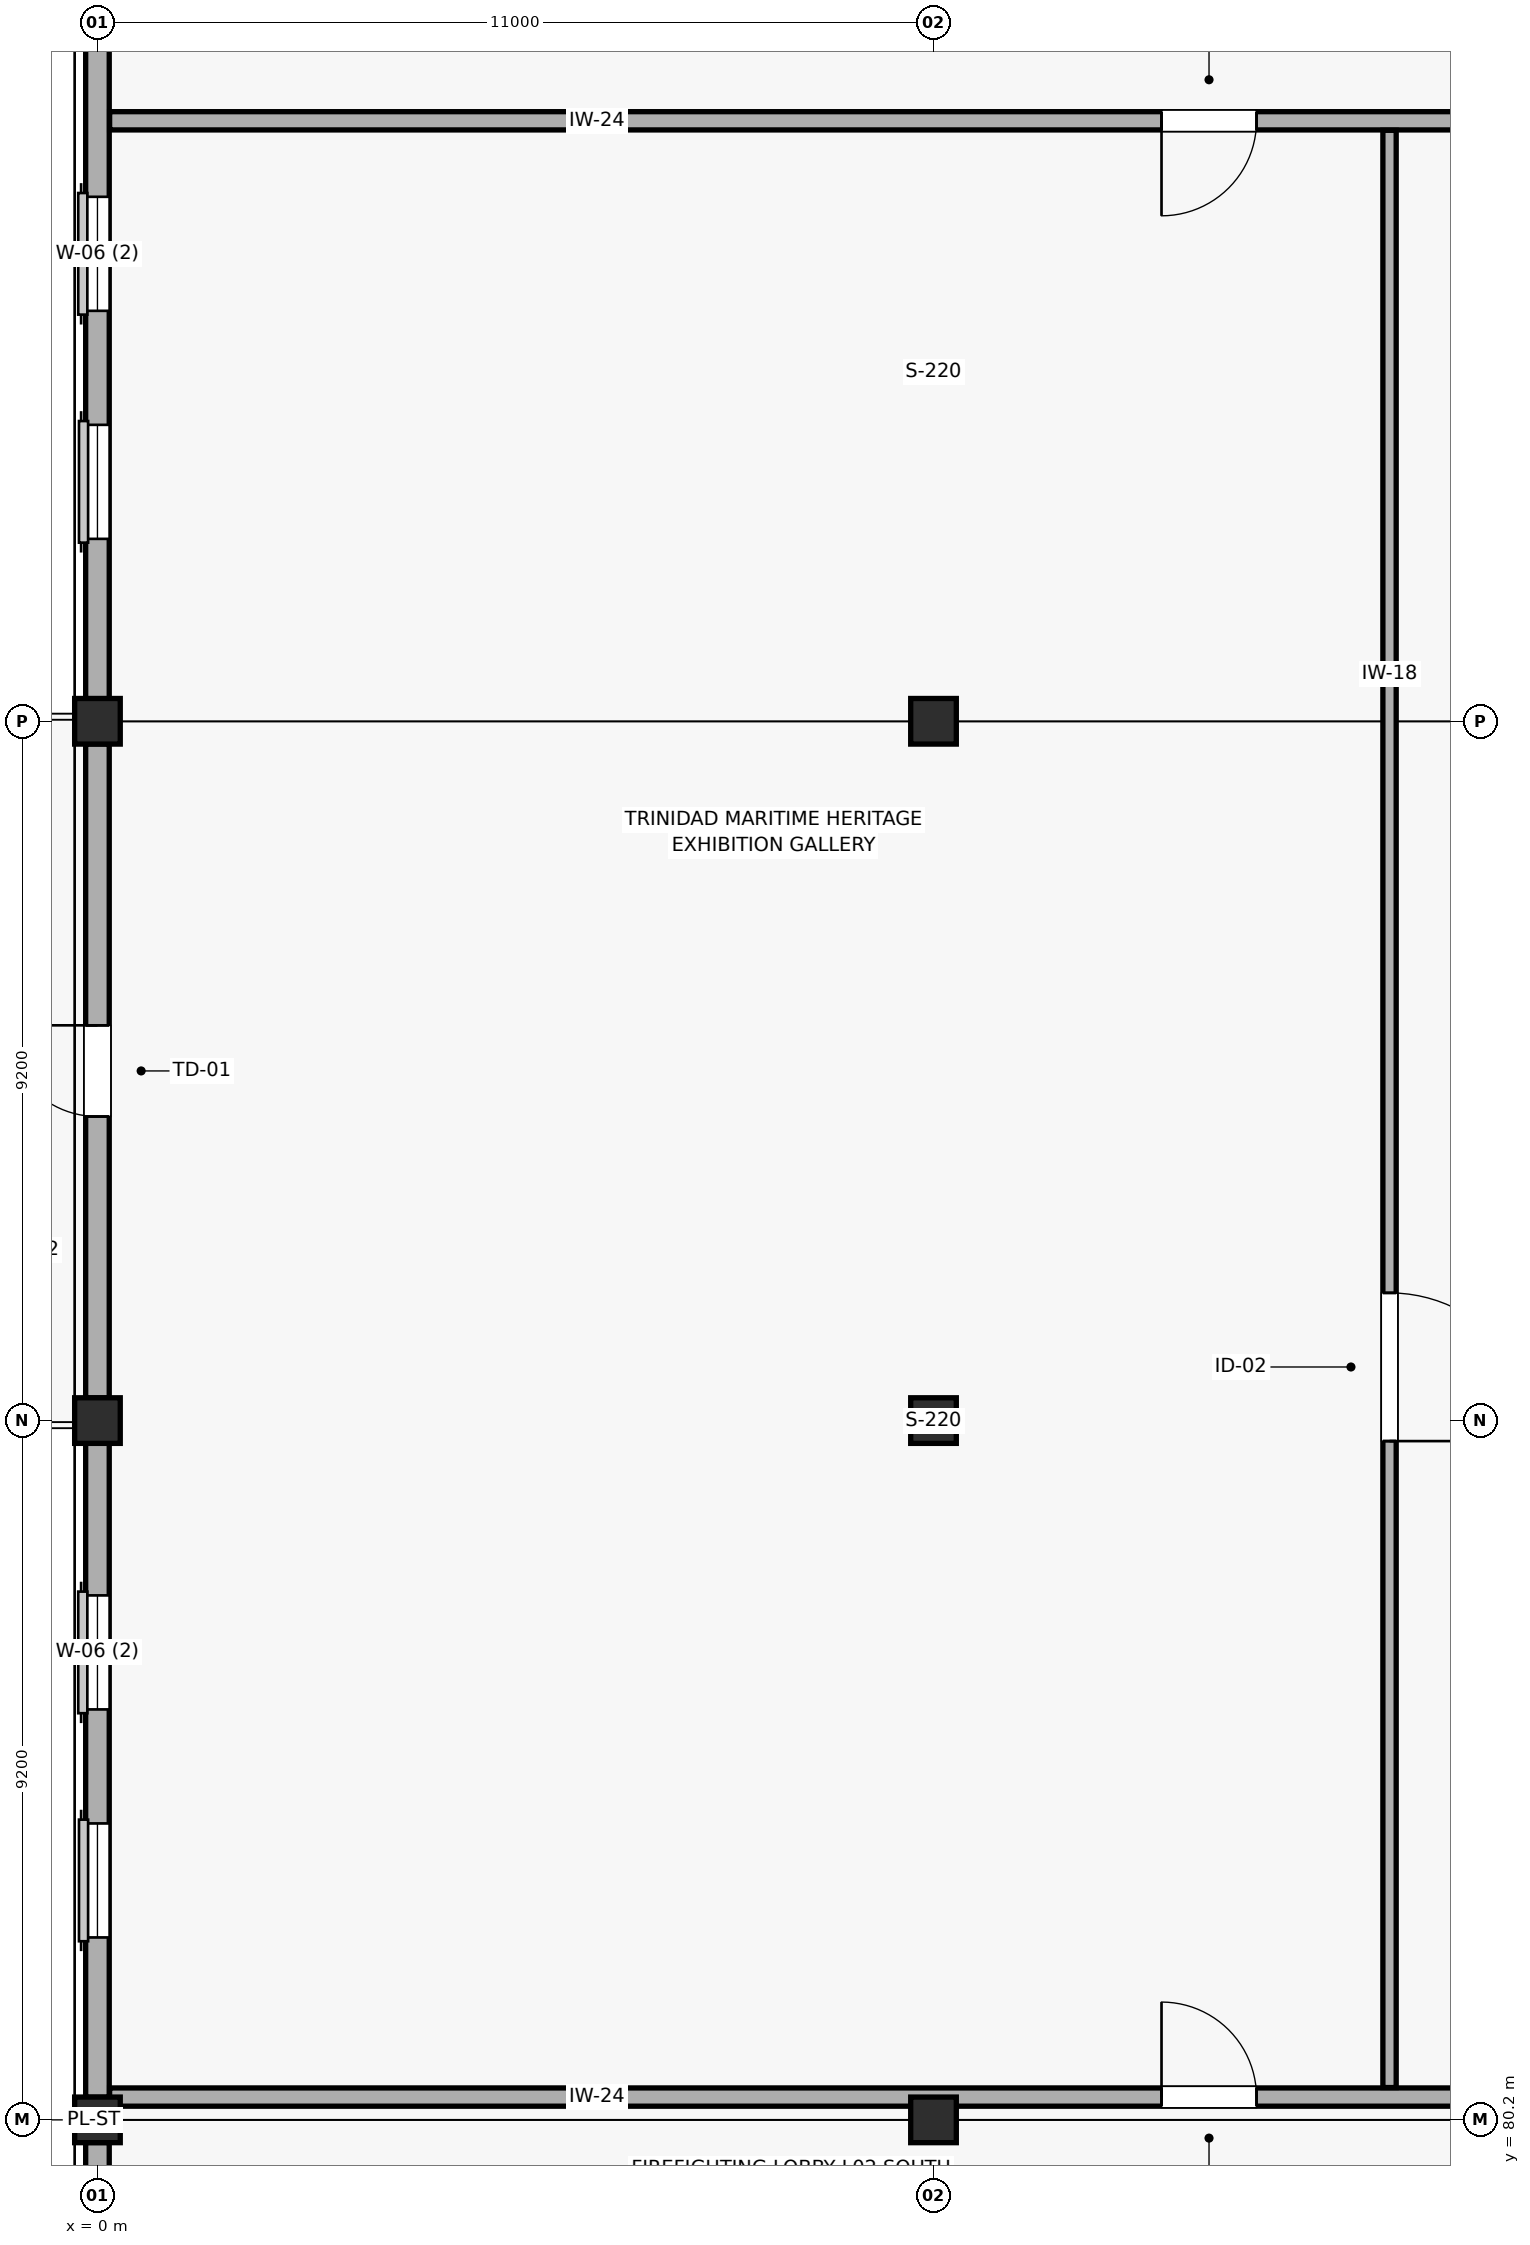
"""IFC4 building model, lengths in metres.
Left out: names, types, materials, properties, quantities, classifications, styles, units other than length and angle.
Written with IfcOpenShell. Run it as: python <this file> out.ifc"""

import sys

from ifc_helpers import new_model, si_unit, direction, frame, frame_2d, origin, origin_2d, place, context, subcontext, project, spatial, rectangle, extrude, element, fill, save


model = new_model("IFC4")
c1 = context("Model", 3, precision=1e-05, world=origin(), true_north=direction((0.0, 1.0)))
c2 = subcontext(c1, "Body", "Model", "MODEL_VIEW")
j1 = project(units=[si_unit("LENGTHUNIT", "METRE"), si_unit("PLANEANGLEUNIT", "RADIAN")], contexts=[c1])
p1 = place(None, origin())
s1 = spatial("IfcSite", under=j1, at=p1, CompositionType="ELEMENT")
p2 = place(p1, origin())
s2 = spatial("IfcBuilding", under=s1, at=p2, CompositionType="ELEMENT")
p3 = place(p2, frame((0.0, 0.0, 9.9)))
s3 = spatial("IfcBuildingStorey", under=s2, at=p3, CompositionType="ELEMENT", Elevation=9.9)
for number, where, z_axis, x_axis in (
    (1, (0.0, 80.2, 0.0), (0.0, 0.0, 1.0), (1.0, 0.0, 0.0)),
    (2, (0.0, 89.4, 0.0), (0.0, 0.0, 1.0), (1.0, 0.0, 0.0)),
    (3, (0.0, 98.6, 0.0), (0.0, 0.0, 1.0), (1.0, 0.0, 0.0)),
    (4, (11.0, 80.2, 0.0), (0.0, 0.0, 1.0), (1.0, 0.0, 0.0)),
    (5, (11.0, 89.4, 0.0), (0.0, 0.0, 1.0), (1.0, 0.0, 0.0)),
    (6, (11.0, 98.6, 0.0), (0.0, 0.0, 1.0), (1.0, 0.0, 0.0)),
):
    element("IfcColumn", number, at=place(p3, frame(where, z_axis=z_axis, x_axis=x_axis)), inside=s3, PredefinedType="COLUMN", context=c2, shape_type="SweptSolid", body=[
        extrude(rectangle(XDim=0.6, YDim=0.6, at=origin_2d()), origin(), (0.0, 0.0, 1.0), 4.2),
    ])
p4 = place(p3, frame((0.0, 79.902, 0.0), z_axis=(0.0, 0.0, 1.0), x_axis=(0.0, -1.0, 0.0)))
e7 = element("IfcWall", 7, at=p4, inside=s3, PredefinedType="SOLIDWALL", context=c2, shape_type="SweptSolid", body=[
    extrude(rectangle(XDim=8.004, YDim=0.31, at=frame_2d((4.002, 0.0))), origin(), (0.0, 0.0, 1.0), 3.525),
])
p5 = place(p4, frame((2.002, 0.0, 0.95)))
e8 = element("IfcOpeningElement", 8, at=p5, cuts=e7, PredefinedType="OPENING", context=c2, shape_type="SweptSolid", body=[
    extrude(rectangle(XDim=1.65, YDim=2.25, at=frame_2d((0.825, 1.125))), frame((0.0, 0.165, 0.0), z_axis=(0.0, -1.0, 0.0), x_axis=(1.0, 0.0, 0.0)), (0.0, 0.0, 1.0), 0.33),
])
p6 = place(p4, frame((5.002, 0.0, 0.95)))
e9 = element("IfcOpeningElement", 9, at=p6, cuts=e7, PredefinedType="OPENING", context=c2, shape_type="SweptSolid", body=[
    extrude(rectangle(XDim=1.65, YDim=2.25, at=frame_2d((0.825, 1.125))), frame((0.0, 0.165, 0.0), z_axis=(0.0, -1.0, 0.0), x_axis=(1.0, 0.0, 0.0)), (0.0, 0.0, 1.0), 0.33),
])
p7 = place(p3, frame((0.0, 89.102, 0.0), z_axis=(0.0, 0.0, 1.0), x_axis=(0.0, -1.0, 0.0)))
e10 = element("IfcWall", 10, at=p7, inside=s3, PredefinedType="SOLIDWALL", context=c2, shape_type="SweptSolid", body=[
    extrude(rectangle(XDim=8.604, YDim=0.31, at=frame_2d((4.302, 0.0))), origin(), (0.0, 0.0, 1.0), 3.525),
])
p8 = place(p7, frame((2.002, 0.0, 0.95)))
e11 = element("IfcOpeningElement", 11, at=p8, cuts=e10, PredefinedType="OPENING", context=c2, shape_type="SweptSolid", body=[
    extrude(rectangle(XDim=1.5, YDim=1.8, at=frame_2d((0.75, 0.9))), frame((0.0, 0.165, 0.0), z_axis=(0.0, -1.0, 0.0), x_axis=(1.0, 0.0, 0.0)), (0.0, 0.0, 1.0), 0.33),
])
p9 = place(p7, frame((5.002, 0.0, 0.95)))
e12 = element("IfcOpeningElement", 12, at=p9, cuts=e10, PredefinedType="OPENING", context=c2, shape_type="SweptSolid", body=[
    extrude(rectangle(XDim=1.5, YDim=1.8, at=frame_2d((0.75, 0.9))), frame((0.0, 0.165, 0.0), z_axis=(0.0, -1.0, 0.0), x_axis=(1.0, 0.0, 0.0)), (0.0, 0.0, 1.0), 0.33),
])
p10 = place(p3, frame((0.0, 98.302, 0.0), z_axis=(0.0, 0.0, 1.0), x_axis=(0.0, -1.0, 0.0)))
e13 = element("IfcWall", 13, at=p10, inside=s3, PredefinedType="SOLIDWALL", context=c2, shape_type="SweptSolid", body=[
    extrude(rectangle(XDim=8.604, YDim=0.31, at=frame_2d((4.302, 0.0))), origin(), (0.0, 0.0, 1.0), 3.525),
])
p11 = place(p10, frame((3.702, 0.0, 0.0)))
e14 = element("IfcOpeningElement", 14, at=p11, cuts=e13, PredefinedType="OPENING", context=c2, shape_type="SweptSolid", body=[
    extrude(rectangle(XDim=1.2, YDim=2.2, at=frame_2d((0.6, 1.1))), frame((0.0, 0.165, 0.0), z_axis=(0.0, -1.0, 0.0), x_axis=(1.0, 0.0, 0.0)), (0.0, 0.0, 1.0), 0.33),
])
p12 = place(p3, frame((0.0, 107.502, 0.0), z_axis=(0.0, 0.0, 1.0), x_axis=(0.0, -1.0, 0.0)))
e15 = element("IfcWall", 15, at=p12, inside=s3, PredefinedType="SOLIDWALL", context=c2, shape_type="SweptSolid", body=[
    extrude(rectangle(XDim=8.604, YDim=0.31, at=frame_2d((4.302, 0.0))), origin(), (0.0, 0.0, 1.0), 3.525),
])
p13 = place(p12, frame((2.002, 0.0, 0.95)))
e16 = element("IfcOpeningElement", 16, at=p13, cuts=e15, PredefinedType="OPENING", context=c2, shape_type="SweptSolid", body=[
    extrude(rectangle(XDim=1.5, YDim=1.8, at=frame_2d((0.75, 0.9))), frame((0.0, 0.165, 0.0), z_axis=(0.0, -1.0, 0.0), x_axis=(1.0, 0.0, 0.0)), (0.0, 0.0, 1.0), 0.33),
])
p14 = place(p12, frame((5.002, 0.0, 0.95)))
e17 = element("IfcOpeningElement", 17, at=p14, cuts=e15, PredefinedType="OPENING", context=c2, shape_type="SweptSolid", body=[
    extrude(rectangle(XDim=1.5, YDim=1.8, at=frame_2d((0.75, 0.9))), frame((0.0, 0.165, 0.0), z_axis=(0.0, -1.0, 0.0), x_axis=(1.0, 0.0, 0.0)), (0.0, 0.0, 1.0), 0.33),
])
p15 = place(p3, frame((0.16, 106.5, 0.0), z_axis=(0.0, 0.0, 1.0), x_axis=(1.0, 0.0, 0.0)))
e18 = element("IfcWall", 18, at=p15, inside=s3, PredefinedType="PARTITIONING", context=c2, shape_type="SweptSolid", body=[
    extrude(rectangle(XDim=18.665, YDim=0.24, at=frame_2d((9.333, 0.0))), origin(), (0.0, 0.0, 1.0), 3.525),
])
p16 = place(p15, frame((13.84, 0.0, 0.0)))
e19 = element("IfcOpeningElement", 19, at=p16, cuts=e18, PredefinedType="OPENING", context=c2, shape_type="SweptSolid", body=[
    extrude(rectangle(XDim=1.25, YDim=2.2, at=frame_2d((0.625, 1.1))), frame((0.0, 0.13, 0.0), z_axis=(0.0, -1.0, 0.0), x_axis=(1.0, 0.0, 0.0)), (0.0, 0.0, 1.0), 0.26),
])
p17 = place(p3, frame((0.16, 80.5, 0.0), z_axis=(0.0, 0.0, 1.0), x_axis=(1.0, 0.0, 0.0)))
e20 = element("IfcWall", 20, at=p17, inside=s3, PredefinedType="PARTITIONING", context=c2, shape_type="SweptSolid", body=[
    extrude(rectangle(XDim=18.665, YDim=0.24, at=frame_2d((9.333, 0.0))), origin(), (0.0, 0.0, 1.0), 3.425),
])
p18 = place(p17, frame((13.84, 0.0, 0.0)))
e21 = element("IfcOpeningElement", 21, at=p18, cuts=e20, PredefinedType="OPENING", context=c2, shape_type="SweptSolid", body=[
    extrude(rectangle(XDim=1.25, YDim=2.2, at=frame_2d((0.625, 1.1))), frame((0.0, 0.13, 0.0), z_axis=(0.0, -1.0, 0.0), x_axis=(1.0, 0.0, 0.0)), (0.0, 0.0, 1.0), 0.26),
])
p19 = place(p3, frame((17.0, 80.625, 0.0), z_axis=(0.0, 0.0, 1.0), x_axis=(0.0, 1.0, 0.0)))
e22 = element("IfcWall", 22, at=p19, inside=s3, PredefinedType="PARTITIONING", context=c2, shape_type="SweptSolid", body=[
    extrude(rectangle(XDim=25.75, YDim=0.175, at=frame_2d((12.875, 0.0))), origin(), (0.0, 0.0, 1.0), 3.425),
])
p20 = place(p19, frame((8.505, 0.0, 0.0)))
e23 = element("IfcOpeningElement", 23, at=p20, cuts=e22, PredefinedType="OPENING", context=c2, shape_type="SweptSolid", body=[
    extrude(rectangle(XDim=1.95, YDim=2.45, at=frame_2d((0.975, 1.225))), frame((0.0, 0.097, 0.0), z_axis=(0.0, -1.0, 0.0), x_axis=(1.0, 0.0, 0.0)), (0.0, 0.0, 1.0), 0.195),
])
p21 = place(p8, origin())
e24 = element("IfcWindow", 24, at=p21, inside=s3, PartitioningType="SINGLE_PANEL", PredefinedType="WINDOW", context=c2, shape_type="SweptSolid", body=[
    extrude(rectangle(XDim=1.5, YDim=1.8, at=frame_2d((0.75, 0.9))), frame((0.0, 0.03, 0.0), z_axis=(0.0, -1.0, 0.0), x_axis=(1.0, 0.0, 0.0)), (0.0, 0.0, 1.0), 0.06),
])
fill(e11, e24)
p22 = place(p9, origin())
e25 = element("IfcWindow", 25, at=p22, inside=s3, PartitioningType="SINGLE_PANEL", PredefinedType="WINDOW", context=c2, shape_type="SweptSolid", body=[
    extrude(rectangle(XDim=1.5, YDim=1.8, at=frame_2d((0.75, 0.9))), frame((0.0, 0.03, 0.0), z_axis=(0.0, -1.0, 0.0), x_axis=(1.0, 0.0, 0.0)), (0.0, 0.0, 1.0), 0.06),
])
fill(e12, e25)
p23 = place(p11, frame((1.2, 0.0, 0.0), z_axis=(0.0, 0.0, 1.0), x_axis=(-1.0, 0.0, 0.0)))
e26 = element("IfcDoor", 26, at=p23, inside=s3, OperationType="SINGLE_SWING_RIGHT", PredefinedType="DOOR", context=c2, shape_type="SweptSolid", body=[
    extrude(rectangle(XDim=1.2, YDim=2.2, at=frame_2d((0.6, 1.1))), frame((0.0, 0.025, 0.0), z_axis=(0.0, -1.0, 0.0), x_axis=(1.0, 0.0, 0.0)), (0.0, 0.0, 1.0), 0.05),
])
fill(e14, e26)
p24 = place(p13, origin())
e27 = element("IfcWindow", 27, at=p24, inside=s3, PartitioningType="SINGLE_PANEL", PredefinedType="WINDOW", context=c2, shape_type="SweptSolid", body=[
    extrude(rectangle(XDim=1.5, YDim=1.8, at=frame_2d((0.75, 0.9))), frame((0.0, 0.03, 0.0), z_axis=(0.0, -1.0, 0.0), x_axis=(1.0, 0.0, 0.0)), (0.0, 0.0, 1.0), 0.06),
])
fill(e16, e27)
p25 = place(p14, origin())
e28 = element("IfcWindow", 28, at=p25, inside=s3, PartitioningType="SINGLE_PANEL", PredefinedType="WINDOW", context=c2, shape_type="SweptSolid", body=[
    extrude(rectangle(XDim=1.5, YDim=1.8, at=frame_2d((0.75, 0.9))), frame((0.0, 0.03, 0.0), z_axis=(0.0, -1.0, 0.0), x_axis=(1.0, 0.0, 0.0)), (0.0, 0.0, 1.0), 0.06),
])
fill(e17, e28)
p26 = place(p16, frame((1.25, 0.0, 0.0), z_axis=(0.0, 0.0, 1.0), x_axis=(-1.0, 0.0, 0.0)))
e29 = element("IfcDoor", 29, at=p26, inside=s3, OperationType="SINGLE_SWING_RIGHT", PredefinedType="DOOR", context=c2, shape_type="SweptSolid", body=[
    extrude(rectangle(XDim=1.25, YDim=2.2, at=frame_2d((0.625, 1.1))), frame((0.0, 0.025, 0.0), z_axis=(0.0, -1.0, 0.0), x_axis=(1.0, 0.0, 0.0)), (0.0, 0.0, 1.0), 0.05),
])
fill(e19, e29)
p27 = place(p18, origin())
e30 = element("IfcDoor", 30, at=p27, inside=s3, OperationType="SINGLE_SWING_LEFT", PredefinedType="DOOR", context=c2, shape_type="SweptSolid", body=[
    extrude(rectangle(XDim=1.25, YDim=2.2, at=frame_2d((0.625, 1.1))), frame((0.0, 0.025, 0.0), z_axis=(0.0, -1.0, 0.0), x_axis=(1.0, 0.0, 0.0)), (0.0, 0.0, 1.0), 0.05),
])
fill(e21, e30)
p28 = place(p20, frame((1.95, 0.0, 0.0), z_axis=(0.0, 0.0, 1.0), x_axis=(-1.0, 0.0, 0.0)))
e31 = element("IfcDoor", 31, at=p28, inside=s3, OperationType="SINGLE_SWING_RIGHT", PredefinedType="DOOR", context=c2, shape_type="SweptSolid", body=[
    extrude(rectangle(XDim=1.95, YDim=2.45, at=frame_2d((0.975, 1.225))), frame((0.0, 0.025, 0.0), z_axis=(0.0, -1.0, 0.0), x_axis=(1.0, 0.0, 0.0)), (0.0, 0.0, 1.0), 0.05),
])
fill(e23, e31)
save(model, sys.argv[1])
